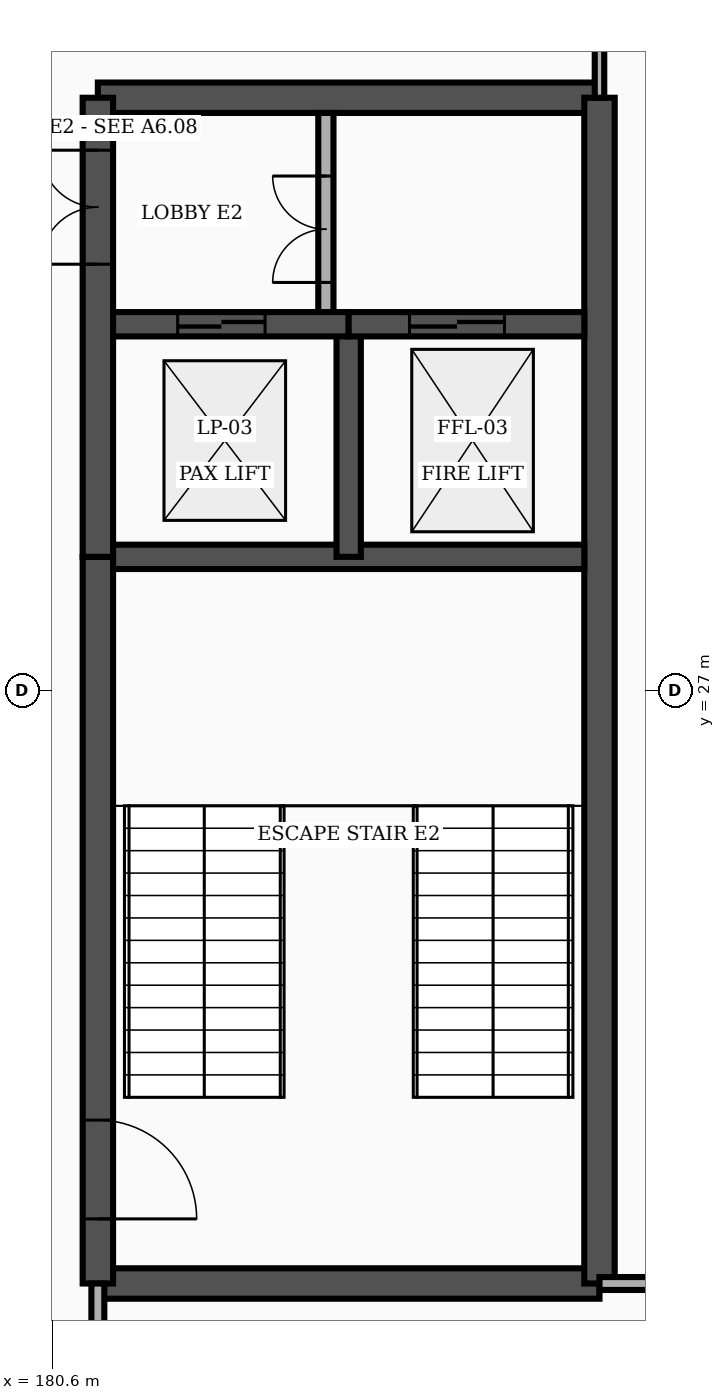
"""IFC4 building model, lengths in metres.
Left out: names, types, materials, properties, quantities, classifications, styles, units other than length and angle.
Written with IfcOpenShell. Run it as: python <this file> out.ifc"""

import sys

from ifc_helpers import new_model, si_unit, direction, frame, frame_2d, origin, place, context, subcontext, project, spatial, rectangle, extrude, element, fill, save


model = new_model("IFC4")
c1 = context("Model", 3, precision=1e-05, world=origin(), true_north=direction((0.0, 1.0)))
c2 = subcontext(c1, "Body", "Model", "MODEL_VIEW")
j1 = project(units=[si_unit("LENGTHUNIT", "METRE"), si_unit("PLANEANGLEUNIT", "RADIAN")], contexts=[c1])
p1 = place(None, origin())
s1 = spatial("IfcSite", under=j1, at=p1, CompositionType="ELEMENT")
p2 = place(p1, origin())
s2 = spatial("IfcBuilding", under=s1, at=p2, CompositionType="ELEMENT")
p3 = place(p2, frame((0.0, 0.0, -4.5)))
s3 = spatial("IfcBuildingStorey", under=s2, at=p3, CompositionType="ELEMENT", Elevation=-4.5)
for number, where, z_axis, x_axis in (
    (1, (181.2, 19.2, 0.0), (0.0, 0.0, 1.0), (1.0, 0.0, 0.0)),
    (2, (181.2, 34.8, 0.0), (0.0, 0.0, 1.0), (1.0, 0.0, 0.0)),
):
    element("IfcWall", number, at=place(p3, frame(where, z_axis=z_axis, x_axis=x_axis)), inside=s3, PredefinedType="SHEAR", context=c2, shape_type="SweptSolid", body=[
        extrude(rectangle(XDim=6.6, YDim=0.4, at=frame_2d((3.3, 0.0))), origin(), (0.0, 0.0, 1.0), 4.24),
    ])
p4 = place(p3, frame((187.8, 19.2, 0.0), z_axis=(0.0, 0.0, 1.0), x_axis=(0.0, 1.0, 0.0)))
e3 = element("IfcWall", 3, at=p4, inside=s3, PredefinedType="SHEAR", context=c2, shape_type="SweptSolid", body=[
    extrude(rectangle(XDim=15.6, YDim=0.4, at=frame_2d((7.8, 0.0))), origin(), (0.0, 0.0, 1.0), 4.24),
])
p5 = place(p3, frame((181.2, 19.2, 0.0), z_axis=(0.0, 0.0, 1.0), x_axis=(0.0, 1.0, 0.0)))
e4 = element("IfcWall", 4, at=p5, inside=s3, PredefinedType="SHEAR", context=c2, shape_type="SweptSolid", body=[
    extrude(rectangle(XDim=9.56, YDim=0.4, at=frame_2d((4.78, 0.0))), origin(), (0.0, 0.0, 1.0), 4.24),
])
p6 = place(p5, frame((0.85, 0.0, 0.0)))
e5 = element("IfcOpeningElement", 5, at=p6, cuts=e4, PredefinedType="OPENING", context=c2, shape_type="SweptSolid", body=[
    extrude(rectangle(XDim=1.3, YDim=2.2, at=frame_2d((0.65, 1.1))), frame((0.0, 0.212, 0.0), z_axis=(0.0, -1.0, 0.0), x_axis=(1.0, 0.0, 0.0)), (0.0, 0.0, 1.0), 0.424),
])
p7 = place(p3, frame((181.2, 28.76, 0.0), z_axis=(0.0, 0.0, 1.0), x_axis=(0.0, 1.0, 0.0)))
e6 = element("IfcWall", 6, at=p7, inside=s3, PredefinedType="SHEAR", context=c2, shape_type="SweptSolid", body=[
    extrude(rectangle(XDim=6.04, YDim=0.4, at=frame_2d((3.02, 0.0))), origin(), (0.0, 0.0, 1.0), 4.24),
])
p8 = place(p7, frame((3.85, 0.0, 0.0)))
e7 = element("IfcOpeningElement", 7, at=p8, cuts=e6, PredefinedType="OPENING", context=c2, shape_type="SweptSolid", body=[
    extrude(rectangle(XDim=1.5, YDim=2.2, at=frame_2d((0.75, 1.1))), frame((0.0, 0.212, 0.0), z_axis=(0.0, -1.0, 0.0), x_axis=(1.0, 0.0, 0.0)), (0.0, 0.0, 1.0), 0.424),
])
p9 = place(p3, frame((181.4, 28.76, 0.0), z_axis=(0.0, 0.0, 1.0), x_axis=(1.0, 0.0, 0.0)))
e8 = element("IfcWall", 8, at=p9, inside=s3, PredefinedType="SHEAR", context=c2, shape_type="SweptSolid", body=[
    extrude(rectangle(XDim=6.2, YDim=0.32, at=frame_2d((3.1, 0.0))), origin(), (0.0, 0.0, 1.0), 4.24),
])
p10 = place(p3, frame((184.5, 28.76, 0.0), z_axis=(0.0, 0.0, 1.0), x_axis=(0.0, 1.0, 0.0)))
e9 = element("IfcWall", 9, at=p10, inside=s3, PredefinedType="SHEAR", context=c2, shape_type="SweptSolid", body=[
    extrude(rectangle(XDim=3.06, YDim=0.32, at=frame_2d((1.53, 0.0))), origin(), (0.0, 0.0, 1.0), 4.24),
])
p11 = place(p3, frame((184.2, 31.82, 0.0), z_axis=(0.0, 0.0, 1.0), x_axis=(0.0, 1.0, 0.0)))
e10 = element("IfcWall", 10, at=p11, inside=s3, PredefinedType="PARTITIONING", context=c2, shape_type="SweptSolid", body=[
    extrude(rectangle(XDim=2.78, YDim=0.2, at=frame_2d((1.39, 0.0))), origin(), (0.0, 0.0, 1.0), 4.24),
])
p12 = place(p11, frame((0.55, 0.0, 0.0)))
e11 = element("IfcOpeningElement", 11, at=p12, cuts=e10, PredefinedType="OPENING", context=c2, shape_type="SweptSolid", body=[
    extrude(rectangle(XDim=1.4, YDim=2.25, at=frame_2d((0.7, 1.125))), frame((0.0, 0.112, 0.0), z_axis=(0.0, -1.0, 0.0), x_axis=(1.0, 0.0, 0.0)), (0.0, 0.0, 1.0), 0.224),
])
p13 = place(p3, frame((181.4, 31.82, 0.0), z_axis=(0.0, 0.0, 1.0), x_axis=(1.0, 0.0, 0.0)))
e12 = element("IfcWall", 12, at=p13, inside=s3, PredefinedType="SHEAR", context=c2, shape_type="SweptSolid", body=[
    extrude(rectangle(XDim=3.1, YDim=0.32, at=frame_2d((1.55, 0.0))), origin(), (0.0, 0.0, 1.0), 4.24),
])
p14 = place(p13, frame((0.85, 0.0, 0.0)))
e13 = element("IfcOpeningElement", 13, at=p14, cuts=e12, PredefinedType="OPENING", context=c2, shape_type="SweptSolid", body=[
    extrude(rectangle(XDim=1.15, YDim=2.2, at=frame_2d((0.575, 1.1))), frame((0.0, 0.172, 0.0), z_axis=(0.0, -1.0, 0.0), x_axis=(1.0, 0.0, 0.0)), (0.0, 0.0, 1.0), 0.344),
])
p15 = place(p3, frame((184.5, 31.82, 0.0), z_axis=(0.0, 0.0, 1.0), x_axis=(1.0, 0.0, 0.0)))
e14 = element("IfcWall", 14, at=p15, inside=s3, PredefinedType="SHEAR", context=c2, shape_type="SweptSolid", body=[
    extrude(rectangle(XDim=3.1, YDim=0.32, at=frame_2d((1.55, 0.0))), origin(), (0.0, 0.0, 1.0), 4.24),
])
p16 = place(p15, frame((0.8, 0.0, 0.0)))
e15 = element("IfcOpeningElement", 15, at=p16, cuts=e14, PredefinedType="OPENING", context=c2, shape_type="SweptSolid", body=[
    extrude(rectangle(XDim=1.25, YDim=2.25, at=frame_2d((0.625, 1.125))), frame((0.0, 0.172, 0.0), z_axis=(0.0, -1.0, 0.0), x_axis=(1.0, 0.0, 0.0)), (0.0, 0.0, 1.0), 0.344),
])
p17 = place(p3, frame((187.8, 34.8, 0.0), z_axis=(0.0, 0.0, 1.0), x_axis=(0.0, 1.0, 0.0)))
e16 = element("IfcWall", 16, at=p17, inside=s3, PredefinedType="PARTITIONING", context=c2, shape_type="SweptSolid", body=[
    extrude(rectangle(XDim=2.0, YDim=0.125, at=frame_2d((1.0, 0.0))), origin(), (0.0, 0.0, 1.0), 4.24),
])
p18 = place(p3, frame((187.8, 19.2, 0.0), z_axis=(0.0, 0.0, 1.0), x_axis=(1.0, 0.0, 0.0)))
e17 = element("IfcWall", 17, at=p18, inside=s3, PredefinedType="PARTITIONING", context=c2, shape_type="SweptSolid", body=[
    extrude(rectangle(XDim=9.99, YDim=0.17, at=frame_2d((4.995, 0.0))), origin(), (0.0, 0.0, 1.0), 4.24),
])
p19 = place(p3, frame((181.2, 0.21, 0.0), z_axis=(0.0, 0.0, 1.0), x_axis=(0.0, 1.0, 0.0)))
e18 = element("IfcWall", 18, at=p19, inside=s3, PredefinedType="PARTITIONING", context=c2, shape_type="SweptSolid", body=[
    extrude(rectangle(XDim=18.99, YDim=0.17, at=frame_2d((9.495, 0.0))), origin(), (0.0, 0.0, 1.0), 4.24),
])
p20 = place(p19, frame((3.3, 0.0, 0.0)))
e19 = element("IfcOpeningElement", 19, at=p20, cuts=e18, PredefinedType="OPENING", context=c2, shape_type="SweptSolid", body=[
    extrude(rectangle(XDim=1.15, YDim=2.15, at=frame_2d((0.575, 1.075))), frame((0.0, 0.097, 0.0), z_axis=(0.0, -1.0, 0.0), x_axis=(1.0, 0.0, 0.0)), (0.0, 0.0, 1.0), 0.194),
])
p21 = place(p6, frame((1.3, 0.0, 0.0), z_axis=(0.0, 0.0, 1.0), x_axis=(-1.0, 0.0, 0.0)))
e20 = element("IfcDoor", 20, at=p21, inside=s3, OperationType="SINGLE_SWING_RIGHT", PredefinedType="DOOR", context=c2, shape_type="SweptSolid", body=[
    extrude(rectangle(XDim=1.3, YDim=2.2, at=frame_2d((0.65, 1.1))), frame((0.0, 0.025, 0.0), z_axis=(0.0, -1.0, 0.0), x_axis=(1.0, 0.0, 0.0)), (0.0, 0.0, 1.0), 0.05),
])
fill(e5, e20)
p22 = place(p8, origin())
e21 = element("IfcDoor", 21, at=p22, inside=s3, OperationType="DOUBLE_DOOR_SINGLE_SWING", PredefinedType="DOOR", context=c2, shape_type="SweptSolid", body=[
    extrude(rectangle(XDim=1.5, YDim=2.2, at=frame_2d((0.75, 1.1))), frame((0.0, 0.025, 0.0), z_axis=(0.0, -1.0, 0.0), x_axis=(1.0, 0.0, 0.0)), (0.0, 0.0, 1.0), 0.05),
])
fill(e7, e21)
p23 = place(p12, origin())
e22 = element("IfcDoor", 22, at=p23, inside=s3, OperationType="DOUBLE_DOOR_SINGLE_SWING", PredefinedType="DOOR", context=c2, shape_type="SweptSolid", body=[
    extrude(rectangle(XDim=1.4, YDim=2.25, at=frame_2d((0.7, 1.125))), frame((0.0, 0.025, 0.0), z_axis=(0.0, -1.0, 0.0), x_axis=(1.0, 0.0, 0.0)), (0.0, 0.0, 1.0), 0.05),
])
fill(e11, e22)
p24 = place(p14, origin())
e23 = element("IfcDoor", 23, at=p24, inside=s3, OperationType="DOUBLE_DOOR_SLIDING", PredefinedType="DOOR", context=c2, shape_type="SweptSolid", body=[
    extrude(rectangle(XDim=1.15, YDim=2.2, at=frame_2d((0.575, 1.1))), frame((0.0, 0.025, 0.0), z_axis=(0.0, -1.0, 0.0), x_axis=(1.0, 0.0, 0.0)), (0.0, 0.0, 1.0), 0.05),
])
fill(e13, e23)
p25 = place(p16, origin())
e24 = element("IfcDoor", 24, at=p25, inside=s3, OperationType="DOUBLE_DOOR_SLIDING", PredefinedType="DOOR", context=c2, shape_type="SweptSolid", body=[
    extrude(rectangle(XDim=1.25, YDim=2.25, at=frame_2d((0.625, 1.125))), frame((0.0, 0.025, 0.0), z_axis=(0.0, -1.0, 0.0), x_axis=(1.0, 0.0, 0.0)), (0.0, 0.0, 1.0), 0.05),
])
fill(e15, e24)
save(model, sys.argv[1])
